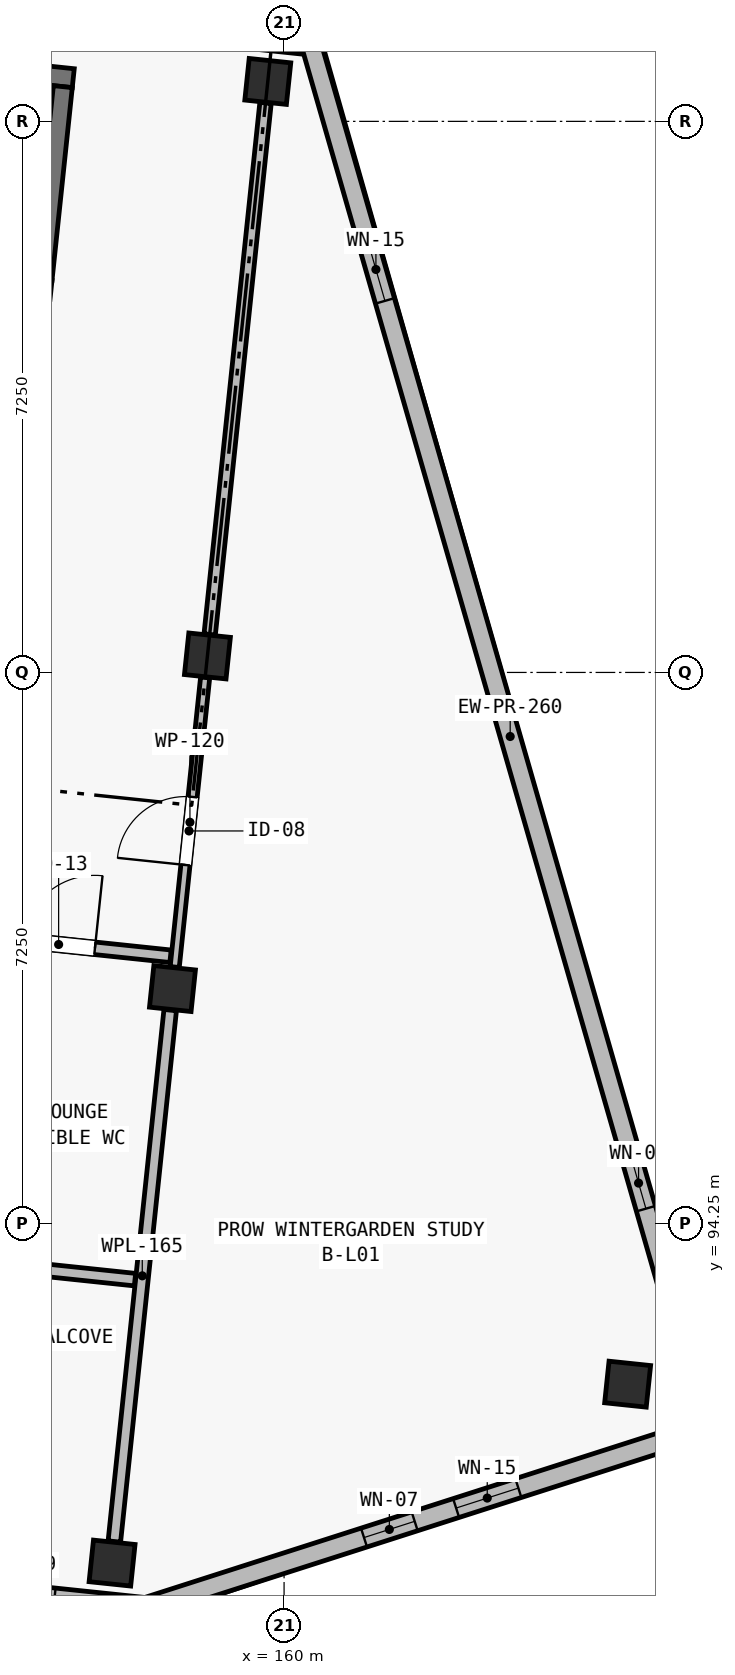
"""IFC4 building model, lengths in metres.
Left out: names, types, materials, properties, quantities, classifications, styles, units other than length and angle.
Written with IfcOpenShell. Run it as: python <this file> out.ifc"""

import sys

from ifc_helpers import new_model, si_unit, direction, frame, frame_2d, origin, origin_2d, place, context, subcontext, project, spatial, rectangle, extrude, element, fill, save


model = new_model("IFC4")
c1 = context("Model", 3, precision=1e-05, world=origin(), true_north=direction((0.0, 1.0)))
c2 = subcontext(c1, "Body", "Model", "MODEL_VIEW")
j1 = project(units=[si_unit("LENGTHUNIT", "METRE"), si_unit("PLANEANGLEUNIT", "RADIAN")], contexts=[c1])
p1 = place(None, origin())
s1 = spatial("IfcSite", under=j1, at=p1, CompositionType="ELEMENT")
p2 = place(p1, origin())
s2 = spatial("IfcBuilding", under=s1, at=p2, CompositionType="ELEMENT")
p3 = place(p2, frame((0.0, 0.0, 4.5)))
s3 = spatial("IfcBuildingStorey", under=s2, at=p3, CompositionType="ELEMENT", Elevation=4.5)
for number, where, z_axis, x_axis in (
    (1, (157.737, 89.783, 0.0), (0.0, 0.0, 1.0), (0.995, -0.105, 0.0)),
    (2, (158.531, 97.341, 0.0), (0.0, 0.0, 1.0), (0.995, -0.105, 0.0)),
    (3, (158.991, 101.717, 0.0), (0.0, 0.0, 1.0), (0.995, -0.105, 0.0)),
    (4, (159.786, 109.275, 0.0), (0.0, 0.0, 1.0), (0.995, -0.105, 0.0)),
    (5, (164.52, 92.136, 0.0), (0.0, 0.0, 1.0), (0.995, -0.105, 0.0)),
):
    element("IfcColumn", number, at=place(p3, frame(where, z_axis=z_axis, x_axis=x_axis)), inside=s3, PredefinedType="COLUMN", context=c2, shape_type="SweptSolid", body=[
        extrude(rectangle(XDim=0.55, YDim=0.55, at=origin_2d()), origin(), (0.0, 0.0, 1.0), 3.9),
    ])
p4 = place(p3, frame((152.204, 109.846, 0.0), z_axis=(0.0, 0.0, 1.0), x_axis=(0.994522922189, -0.104518693261, 0.0)))
e6 = element("IfcWall", 6, at=p4, inside=s3, PredefinedType="SHEAR", context=c2, shape_type="SweptSolid", body=[
    extrude(rectangle(XDim=5.05, YDim=0.25, at=frame_2d((2.525, 0.0))), origin(), (0.0, 0.0, 1.0), 3.9),
])
p5 = place(p3, frame((156.822, 106.671, 0.0), z_axis=(0.0, 0.0, 1.0), x_axis=(0.104545242946, 0.99452013161, 0.0)))
e7 = element("IfcWall", 7, at=p5, inside=s3, PredefinedType="SHEAR", context=c2, shape_type="SweptSolid", body=[
    extrude(rectangle(XDim=2.55, YDim=0.25, at=frame_2d((1.275, 0.0))), origin(), (0.0, 0.0, 1.0), 3.9),
])
p6 = place(p3, frame((158.204, 89.206, 0.0), z_axis=(0.0, 0.0, 1.0), x_axis=(-0.994521760736, 0.104529744196, 0.0)))
e8 = element("IfcWall", 8, at=p6, inside=s3, PredefinedType="SOLIDWALL", context=c2, shape_type="SweptSolid", body=[
    extrude(rectangle(XDim=8.525, YDim=0.24, at=frame_2d((4.262, 0.0))), origin(), (0.0, 0.0, 1.0), 3.65),
])
p7 = place(p6, frame((1.23, 0.0, 0.42)))
e9 = element("IfcOpeningElement", 9, at=p7, cuts=e8, PredefinedType="OPENING", context=c2, shape_type="SweptSolid", body=[
    extrude(rectangle(XDim=0.74, YDim=2.26, at=frame_2d((0.37, 1.13))), frame((0.0, 0.135, 0.0), z_axis=(0.0, -1.0, 0.0), x_axis=(1.0, 0.0, 0.0)), (0.0, 0.0, 1.0), 0.27),
])
p8 = place(p6, frame((5.203, 0.0, 0.42)))
e10 = element("IfcOpeningElement", 10, at=p8, cuts=e8, PredefinedType="OPENING", context=c2, shape_type="SweptSolid", body=[
    extrude(rectangle(XDim=0.8, YDim=2.3, at=frame_2d((0.4, 1.15))), frame((0.0, 0.135, 0.0), z_axis=(0.0, -1.0, 0.0), x_axis=(1.0, 0.0, 0.0)), (0.0, 0.0, 1.0), 0.27),
])
p9 = place(p3, frame((151.885, 110.634, 0.0), z_axis=(0.0, 0.0, 1.0), x_axis=(0.994521760736, -0.104529744196, 0.0)))
e11 = element("IfcWall", 11, at=p9, inside=s3, PredefinedType="SOLIDWALL", context=c2, shape_type="SweptSolid", body=[
    extrude(rectangle(XDim=8.525, YDim=0.24, at=frame_2d((4.262, 0.0))), origin(), (0.0, 0.0, 1.0), 3.65),
])
p10 = place(p9, frame((6.925, 0.0, 0.45)))
e12 = element("IfcOpeningElement", 12, at=p10, cuts=e11, PredefinedType="OPENING", context=c2, shape_type="SweptSolid", body=[
    extrude(rectangle(XDim=0.75, YDim=2.32, at=frame_2d((0.375, 1.16))), frame((0.0, 0.135, 0.0), z_axis=(0.0, -1.0, 0.0), x_axis=(1.0, 0.0, 0.0)), (0.0, 0.0, 1.0), 0.27),
])
p11 = place(p3, frame((160.363, 109.742, 0.0), z_axis=(0.0, 0.0, 1.0), x_axis=(0.276322184526, -0.961065060409, 0.0)))
e13 = element("IfcWall", 13, at=p11, inside=s3, PredefinedType="SOLIDWALL", context=c2, shape_type="SweptSolid", body=[
    extrude(rectangle(XDim=18.907, YDim=0.26, at=frame_2d((9.453, 0.0))), origin(), (0.0, 0.0, 1.0), 3.65),
])
p12 = place(p11, frame((2.63, 0.0, 0.52)))
e14 = element("IfcOpeningElement", 14, at=p12, cuts=e13, PredefinedType="OPENING", context=c2, shape_type="SweptSolid", body=[
    extrude(rectangle(XDim=0.86, YDim=2.36, at=frame_2d((0.43, 1.18))), frame((0.0, 0.145, 0.0), z_axis=(0.0, -1.0, 0.0), x_axis=(1.0, 0.0, 0.0)), (0.0, 0.0, 1.0), 0.29),
])
p13 = place(p11, frame((15.217, 0.0, 0.45)))
e15 = element("IfcOpeningElement", 15, at=p13, cuts=e13, PredefinedType="OPENING", context=c2, shape_type="SweptSolid", body=[
    extrude(rectangle(XDim=0.7, YDim=2.36, at=frame_2d((0.35, 1.18))), frame((0.0, 0.145, 0.0), z_axis=(0.0, -1.0, 0.0), x_axis=(1.0, 0.0, 0.0)), (0.0, 0.0, 1.0), 0.29),
])
p14 = place(p3, frame((165.587, 91.572, 0.0), z_axis=(0.0, 0.0, 1.0), x_axis=(-0.9522851043, -0.305209895201, 0.0)))
e16 = element("IfcWall", 16, at=p14, inside=s3, PredefinedType="SOLIDWALL", context=c2, shape_type="SweptSolid", body=[
    extrude(rectangle(XDim=7.753, YDim=0.26, at=frame_2d((3.876, 0.0))), origin(), (0.0, 0.0, 1.0), 3.65),
])
p15 = place(p14, frame((2.63, 0.0, 0.52)))
e17 = element("IfcOpeningElement", 17, at=p15, cuts=e16, PredefinedType="OPENING", context=c2, shape_type="SweptSolid", body=[
    extrude(rectangle(XDim=0.86, YDim=2.36, at=frame_2d((0.43, 1.18))), frame((0.0, 0.145, 0.0), z_axis=(0.0, -1.0, 0.0), x_axis=(1.0, 0.0, 0.0)), (0.0, 0.0, 1.0), 0.29),
])
p16 = place(p14, frame((4.063, 0.0, 0.45)))
e18 = element("IfcOpeningElement", 18, at=p16, cuts=e16, PredefinedType="OPENING", context=c2, shape_type="SweptSolid", body=[
    extrude(rectangle(XDim=0.7, YDim=2.36, at=frame_2d((0.35, 1.18))), frame((0.0, 0.145, 0.0), z_axis=(0.0, -1.0, 0.0), x_axis=(1.0, 0.0, 0.0)), (0.0, 0.0, 1.0), 0.29),
])
p17 = place(p3, frame((158.561, 97.625, 0.0), z_axis=(0.0, 0.0, 1.0), x_axis=(0.104545412893, 0.994520113745, 0.0)))
e19 = element("IfcWall", 19, at=p17, inside=s3, PredefinedType="PARTITIONING", context=c2, shape_type="SweptSolid", body=[
    extrude(rectangle(XDim=3.83, YDim=0.12, at=frame_2d((1.915, 0.0))), origin(), (0.0, 0.0, 1.0), 3.15),
])
p18 = place(p17, frame((1.35, 0.0, 0.0)))
e20 = element("IfcOpeningElement", 20, at=p18, cuts=e19, PredefinedType="OPENING", context=c2, shape_type="SweptSolid", body=[
    extrude(rectangle(XDim=0.9, YDim=2.1, at=frame_2d((0.45, 1.05))), frame((0.0, 0.075, 0.0), z_axis=(0.0, -1.0, 0.0), x_axis=(1.0, 0.0, 0.0)), (0.0, 0.0, 1.0), 0.15),
])
p19 = place(p3, frame((159.021, 102.0, 0.0), z_axis=(0.0, 0.0, 1.0), x_axis=(0.10452931889, 0.994521805438, 0.0)))
e21 = element("IfcWall", 21, at=p19, inside=s3, PredefinedType="PARTITIONING", context=c2, shape_type="SweptSolid", body=[
    extrude(rectangle(XDim=7.03, YDim=0.15, at=frame_2d((3.515, 0.0))), origin(), (0.0, 0.0, 1.0), 3.15),
])
p20 = place(p3, frame((157.767, 90.066, 0.0), z_axis=(0.0, 0.0, 1.0), x_axis=(0.104532929154, 0.994521425975, 0.0)))
e22 = element("IfcWall", 22, at=p20, inside=s3, PredefinedType="PLUMBINGWALL", context=c2, shape_type="SweptSolid", body=[
    extrude(rectangle(XDim=7.03, YDim=0.165, at=frame_2d((3.515, 0.0))), origin(), (0.0, 0.0, 1.0), 3.15),
])
p21 = place(p3, frame((155.91, 98.039, 0.0), z_axis=(0.0, 0.0, 1.0), x_axis=(0.994526447543, -0.104485143144, 0.0)))
e23 = element("IfcWall", 23, at=p21, inside=s3, PredefinedType="PLUMBINGWALL", context=c2, shape_type="SweptSolid", body=[
    extrude(rectangle(XDim=2.61, YDim=0.165, at=frame_2d((1.305, 0.0))), origin(), (0.0, 0.0, 1.0), 3.62),
])
p22 = place(p21, frame((0.65, 0.0, 0.0)))
e24 = element("IfcOpeningElement", 24, at=p22, cuts=e23, PredefinedType="OPENING", context=c2, shape_type="SweptSolid", body=[
    extrude(rectangle(XDim=0.96, YDim=2.12, at=frame_2d((0.48, 1.06))), frame((0.0, 0.097, 0.0), z_axis=(0.0, -1.0, 0.0), x_axis=(1.0, 0.0, 0.0)), (0.0, 0.0, 1.0), 0.195),
])
p23 = place(p3, frame((155.463, 93.782, 0.0), z_axis=(0.0, 0.0, 1.0), x_axis=(0.994521452323, -0.104532678478, 0.0)))
e25 = element("IfcWall", 25, at=p23, inside=s3, PredefinedType="PLUMBINGWALL", context=c2, shape_type="SweptSolid", body=[
    extrude(rectangle(XDim=2.59, YDim=0.165, at=frame_2d((1.295, 0.0))), origin(), (0.0, 0.0, 1.0), 3.62),
])
p24 = place(p7, origin())
e26 = element("IfcWindow", 26, at=p24, inside=s3, PartitioningType="SINGLE_PANEL", PredefinedType="WINDOW", context=c2, shape_type="SweptSolid", body=[
    extrude(rectangle(XDim=0.74, YDim=2.26, at=frame_2d((0.37, 1.13))), frame((0.0, 0.03, 0.0), z_axis=(0.0, -1.0, 0.0), x_axis=(1.0, 0.0, 0.0)), (0.0, 0.0, 1.0), 0.06),
])
fill(e9, e26)
p25 = place(p12, origin())
e27 = element("IfcWindow", 27, at=p25, inside=s3, PartitioningType="SINGLE_PANEL", PredefinedType="WINDOW", context=c2, shape_type="SweptSolid", body=[
    extrude(rectangle(XDim=0.86, YDim=2.36, at=frame_2d((0.43, 1.18))), frame((0.0, 0.03, 0.0), z_axis=(0.0, -1.0, 0.0), x_axis=(1.0, 0.0, 0.0)), (0.0, 0.0, 1.0), 0.06),
])
fill(e14, e27)
p26 = place(p13, origin())
e28 = element("IfcWindow", 28, at=p26, inside=s3, PartitioningType="SINGLE_PANEL", PredefinedType="WINDOW", context=c2, shape_type="SweptSolid", body=[
    extrude(rectangle(XDim=0.7, YDim=2.36, at=frame_2d((0.35, 1.18))), frame((0.0, 0.03, 0.0), z_axis=(0.0, -1.0, 0.0), x_axis=(1.0, 0.0, 0.0)), (0.0, 0.0, 1.0), 0.06),
])
fill(e15, e28)
p27 = place(p15, origin())
e29 = element("IfcWindow", 29, at=p27, inside=s3, PartitioningType="SINGLE_PANEL", PredefinedType="WINDOW", context=c2, shape_type="SweptSolid", body=[
    extrude(rectangle(XDim=0.86, YDim=2.36, at=frame_2d((0.43, 1.18))), frame((0.0, 0.03, 0.0), z_axis=(0.0, -1.0, 0.0), x_axis=(1.0, 0.0, 0.0)), (0.0, 0.0, 1.0), 0.06),
])
fill(e17, e29)
p28 = place(p16, origin())
e30 = element("IfcWindow", 30, at=p28, inside=s3, PartitioningType="SINGLE_PANEL", PredefinedType="WINDOW", context=c2, shape_type="SweptSolid", body=[
    extrude(rectangle(XDim=0.7, YDim=2.36, at=frame_2d((0.35, 1.18))), frame((0.0, 0.03, 0.0), z_axis=(0.0, -1.0, 0.0), x_axis=(1.0, 0.0, 0.0)), (0.0, 0.0, 1.0), 0.06),
])
fill(e18, e30)
p29 = place(p18, origin())
e31 = element("IfcDoor", 31, at=p29, inside=s3, OperationType="SINGLE_SWING_LEFT", PredefinedType="DOOR", context=c2, shape_type="SweptSolid", body=[
    extrude(rectangle(XDim=0.9, YDim=2.1, at=frame_2d((0.45, 1.05))), frame((0.0, 0.025, 0.0), z_axis=(0.0, -1.0, 0.0), x_axis=(1.0, 0.0, 0.0)), (0.0, 0.0, 1.0), 0.05),
])
fill(e20, e31)
p30 = place(p22, origin())
e32 = element("IfcDoor", 32, at=p30, inside=s3, OperationType="SINGLE_SWING_RIGHT", PredefinedType="DOOR", context=c2, shape_type="SweptSolid", body=[
    extrude(rectangle(XDim=0.96, YDim=2.12, at=frame_2d((0.48, 1.06))), frame((0.0, 0.025, 0.0), z_axis=(0.0, -1.0, 0.0), x_axis=(1.0, 0.0, 0.0)), (0.0, 0.0, 1.0), 0.05),
])
fill(e24, e32)
save(model, sys.argv[1])
